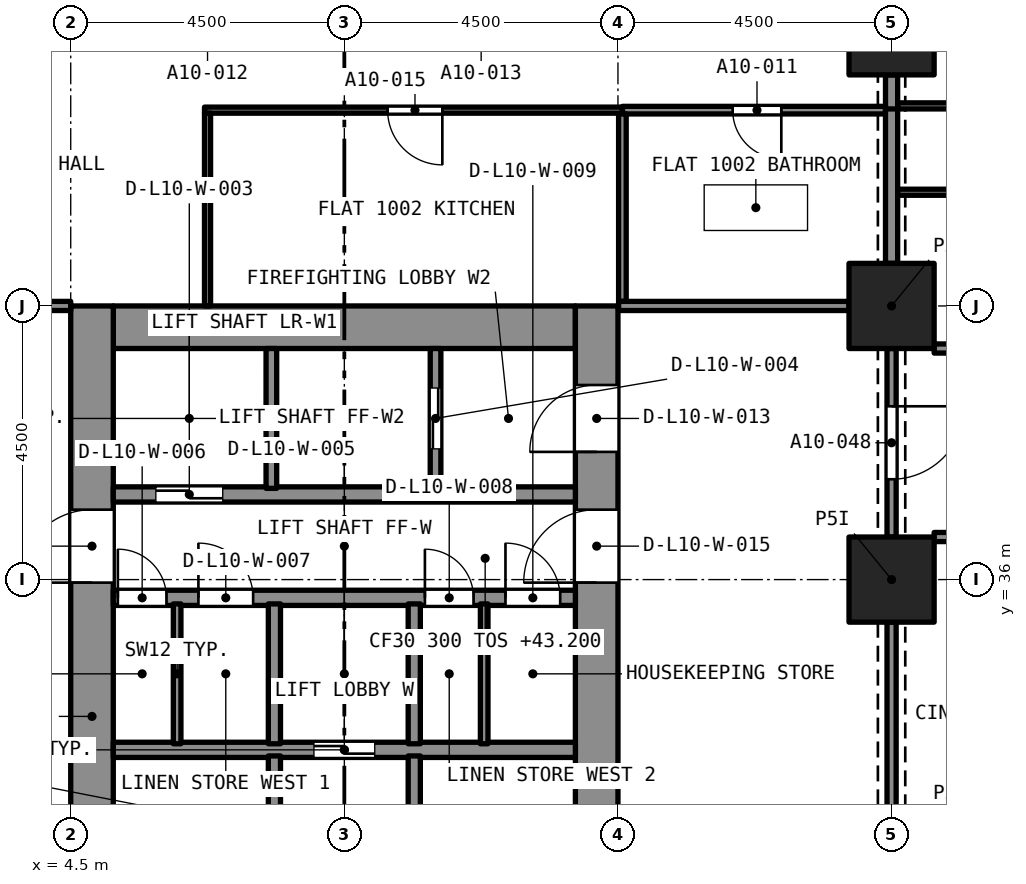
"""IFC4 building model, lengths in metres.
Left out: names, types, materials, properties, quantities, classifications, styles, units other than length and angle.
Written with IfcOpenShell. Run it as: python <this file> out.ifc"""

import sys

from ifc_helpers import new_model, si_unit, direction, frame, frame_2d, origin, origin_2d, place, context, subcontext, project, spatial, rectangle, extrude, element, fill, save


model = new_model("IFC4")
c1 = context("Model", 3, precision=1e-05, world=origin(), true_north=direction((0.0, 1.0)))
c2 = subcontext(c1, "Body", "Model", "MODEL_VIEW")
j1 = project(units=[si_unit("LENGTHUNIT", "METRE"), si_unit("PLANEANGLEUNIT", "RADIAN")], contexts=[c1])
p1 = place(None, origin())
s1 = spatial("IfcSite", under=j1, at=p1, CompositionType="ELEMENT")
p2 = place(p1, origin())
s2 = spatial("IfcBuilding", under=s1, at=p2, CompositionType="ELEMENT")
p3 = place(p2, frame((0.0, 0.0, 43.2)))
s3 = spatial("IfcBuildingStorey", under=s2, at=p3, CompositionType="ELEMENT", Elevation=43.2)
for number, where, z_axis, x_axis in (
    (1, (18.0, 36.0, 0.0), (0.0, 0.0, 1.0), (1.0, 0.0, 0.0)),
    (2, (18.0, 40.5, 0.0), (0.0, 0.0, 1.0), (1.0, 0.0, 0.0)),
    (3, (18.0, 45.0, 0.0), (0.0, 0.0, 1.0), (1.0, 0.0, 0.0)),
):
    element("IfcColumn", number, at=place(p3, frame(where, z_axis=z_axis, x_axis=x_axis)), inside=s3, PredefinedType="COLUMN", context=c2, shape_type="SweptSolid", body=[
        extrude(rectangle(XDim=1.4, YDim=1.4, at=origin_2d()), origin(), (0.0, 0.0, 1.0), 3.2),
    ])
p4 = place(p3, frame((5.2, 40.15, 0.0), z_axis=(0.0, 0.0, 1.0), x_axis=(1.0, 0.0, 0.0)))
e4 = element("IfcWall", 4, at=p4, inside=s3, PredefinedType="SOLIDWALL", context=c2, shape_type="SweptSolid", body=[
    extrude(rectangle(XDim=7.6, YDim=0.7, at=frame_2d((3.8, 0.0))), origin(), (0.0, 0.0, 1.0), 3.2),
])
p5 = place(p3, frame((4.85, 27.0, 0.0), z_axis=(0.0, 0.0, 1.0), x_axis=(0.0, 1.0, 0.0)))
e5 = element("IfcWall", 5, at=p5, inside=s3, PredefinedType="SOLIDWALL", context=c2, shape_type="SweptSolid", body=[
    extrude(rectangle(XDim=13.5, YDim=0.7, at=frame_2d((6.75, 0.0))), origin(), (0.0, 0.0, 1.0), 3.2),
])
p6 = place(p5, frame((8.95, 0.0, 0.0)))
e6 = element("IfcOpeningElement", 6, at=p6, cuts=e5, PredefinedType="OPENING", context=c2, shape_type="SweptSolid", body=[
    extrude(rectangle(XDim=1.2, YDim=2.1, at=frame_2d((0.6, 1.05))), frame((0.0, 0.36, 0.0), z_axis=(0.0, -1.0, 0.0), x_axis=(1.0, 0.0, 0.0)), (0.0, 0.0, 1.0), 0.72),
])
p7 = place(p3, frame((13.15, 27.0, 0.0), z_axis=(0.0, 0.0, 1.0), x_axis=(0.0, 1.0, 0.0)))
e7 = element("IfcWall", 7, at=p7, inside=s3, PredefinedType="SOLIDWALL", context=c2, shape_type="SweptSolid", body=[
    extrude(rectangle(XDim=13.5, YDim=0.7, at=frame_2d((6.75, 0.0))), origin(), (0.0, 0.0, 1.0), 3.2),
])
p8 = place(p7, frame((11.1, 0.0, 0.0)))
e8 = element("IfcOpeningElement", 8, at=p8, cuts=e7, PredefinedType="OPENING", context=c2, shape_type="SweptSolid", body=[
    extrude(rectangle(XDim=1.1, YDim=2.1, at=frame_2d((0.55, 1.05))), frame((0.0, 0.36, 0.0), z_axis=(0.0, -1.0, 0.0), x_axis=(1.0, 0.0, 0.0)), (0.0, 0.0, 1.0), 0.72),
])
p9 = place(p7, frame((8.95, 0.0, 0.0)))
e9 = element("IfcOpeningElement", 9, at=p9, cuts=e7, PredefinedType="OPENING", context=c2, shape_type="SweptSolid", body=[
    extrude(rectangle(XDim=1.2, YDim=2.1, at=frame_2d((0.6, 1.05))), frame((0.0, 0.36, 0.0), z_axis=(0.0, -1.0, 0.0), x_axis=(1.0, 0.0, 0.0)), (0.0, 0.0, 1.0), 0.72),
])
p10 = place(p3, frame((17.9, 43.72, 0.0), z_axis=(0.0, 0.0, 1.0), x_axis=(-1.0, 0.0, 0.0)))
e10 = element("IfcWall", 10, at=p10, inside=s3, PredefinedType="PARTITIONING", context=c2, shape_type="SweptSolid", body=[
    extrude(rectangle(XDim=4.327, YDim=0.125, at=frame_2d((2.163, 0.0))), origin(), (0.0, 0.0, 1.0), 2.9),
])
p11 = place(p10, frame((1.713, 0.0, 0.0)))
e11 = element("IfcOpeningElement", 11, at=p11, cuts=e10, PredefinedType="OPENING", context=c2, shape_type="SweptSolid", body=[
    extrude(rectangle(XDim=0.8, YDim=2.1, at=frame_2d((0.4, 1.05))), frame((0.0, 0.073, 0.0), z_axis=(0.0, -1.0, 0.0), x_axis=(1.0, 0.0, 0.0)), (0.0, 0.0, 1.0), 0.145),
])
p12 = place(p3, frame((13.573, 40.575, 0.0), z_axis=(0.0, 0.0, 1.0), x_axis=(0.0, 1.0, 0.0)))
e12 = element("IfcWall", 12, at=p12, inside=s3, PredefinedType="PARTITIONING", context=c2, shape_type="SweptSolid", body=[
    extrude(rectangle(XDim=3.083, YDim=0.125, at=frame_2d((1.541, 0.0))), origin(), (0.0, 0.0, 1.0), 2.9),
])
p13 = place(p3, frame((18.0, 41.2, 0.0), z_axis=(0.0, 0.0, 1.0), x_axis=(0.0, 1.0, 0.0)))
e13 = element("IfcWall", 13, at=p13, inside=s3, PredefinedType="PARTITIONING", context=c2, shape_type="SweptSolid", body=[
    extrude(rectangle(XDim=2.583, YDim=0.2, at=frame_2d((1.291, 0.0))), origin(), (0.0, 0.0, 1.0), 2.38),
])
p14 = place(p3, frame((13.511, 40.5, 0.0), z_axis=(0.0, 0.0, 1.0), x_axis=(1.0, 0.0, 0.0)))
e14 = element("IfcWall", 14, at=p14, inside=s3, PredefinedType="PARTITIONING", context=c2, shape_type="SweptSolid", body=[
    extrude(rectangle(XDim=3.789, YDim=0.15, at=frame_2d((1.895, 0.0))), origin(), (0.0, 0.0, 1.0), 2.9),
])
p15 = place(p3, frame((13.573, 43.72, 0.0), z_axis=(0.0, 0.0, 1.0), x_axis=(-1.0, 0.0, 0.0)))
e15 = element("IfcWall", 15, at=p15, inside=s3, PredefinedType="PARTITIONING", context=c2, shape_type="SweptSolid", body=[
    extrude(rectangle(XDim=6.873, YDim=0.1, at=frame_2d((3.437, 0.0))), origin(), (0.0, 0.0, 1.0), 2.9),
])
p16 = place(p15, frame((2.962, 0.0, 0.0)))
e16 = element("IfcOpeningElement", 16, at=p16, cuts=e15, PredefinedType="OPENING", context=c2, shape_type="SweptSolid", body=[
    extrude(rectangle(XDim=0.9, YDim=2.1, at=frame_2d((0.45, 1.05))), frame((0.0, 0.06, 0.0), z_axis=(0.0, -1.0, 0.0), x_axis=(1.0, 0.0, 0.0)), (0.0, 0.0, 1.0), 0.12),
])
p17 = place(p3, frame((6.75, 40.5, 0.0), z_axis=(0.0, 0.0, 1.0), x_axis=(0.0, 1.0, 0.0)))
e17 = element("IfcWall", 17, at=p17, inside=s3, PredefinedType="PARTITIONING", context=c2, shape_type="SweptSolid", body=[
    extrude(rectangle(XDim=3.17, YDim=0.1, at=frame_2d((1.585, 0.0))), origin(), (0.0, 0.0, 1.0), 2.9),
])
p18 = place(p3, frame((18.0, 43.74, 0.0), z_axis=(0.0, 0.0, 1.0), x_axis=(0.0, 1.0, 0.0)))
e18 = element("IfcWall", 18, at=p18, inside=s3, PredefinedType="PARTITIONING", context=c2, shape_type="SweptSolid", body=[
    extrude(rectangle(XDim=0.56, YDim=0.2, at=frame_2d((0.28, 0.0))), origin(), (0.0, 0.0, 1.0), 2.38),
])
p19 = place(p3, frame((0.7, 40.5, 0.0), z_axis=(0.0, 0.0, 1.0), x_axis=(1.0, 0.0, 0.0)))
e19 = element("IfcWall", 19, at=p19, inside=s3, PredefinedType="PARTITIONING", context=c2, shape_type="SweptSolid", body=[
    extrude(rectangle(XDim=3.8, YDim=0.15, at=frame_2d((1.9, 0.0))), origin(), (0.0, 0.0, 1.0), 2.9),
])
p20 = place(p19, frame((1.05, 0.0, 0.0)))
e20 = element("IfcOpeningElement", 20, at=p20, cuts=e19, PredefinedType="OPENING", context=c2, shape_type="SweptSolid", body=[
    extrude(rectangle(XDim=1.0, YDim=2.1, at=frame_2d((0.5, 1.05))), frame((0.0, 0.085, 0.0), z_axis=(0.0, -1.0, 0.0), x_axis=(1.0, 0.0, 0.0)), (0.0, 0.0, 1.0), 0.17),
])
p21 = place(p3, frame((27.425, 42.37, 0.0), z_axis=(0.0, 0.0, 1.0), x_axis=(-1.0, 0.0, 0.0)))
e21 = element("IfcWall", 21, at=p21, inside=s3, PredefinedType="PARTITIONING", context=c2, shape_type="SweptSolid", body=[
    extrude(rectangle(XDim=9.325, YDim=0.1, at=frame_2d((4.663, 0.0))), origin(), (0.0, 0.0, 1.0), 2.75),
])
p22 = place(p21, frame((4.288, 0.0, 0.0)))
e22 = element("IfcOpeningElement", 22, at=p22, cuts=e21, PredefinedType="OPENING", context=c2, shape_type="SweptSolid", body=[
    extrude(rectangle(XDim=0.9, YDim=2.1, at=frame_2d((0.45, 1.05))), frame((0.0, 0.06, 0.0), z_axis=(0.0, -1.0, 0.0), x_axis=(1.0, 0.0, 0.0)), (0.0, 0.0, 1.0), 0.12),
])
p23 = place(p3, frame((18.1, 43.79, 0.0), z_axis=(0.0, 0.0, 1.0), x_axis=(1.0, 0.0, 0.0)))
e23 = element("IfcWall", 23, at=p23, inside=s3, PredefinedType="PARTITIONING", context=c2, shape_type="SweptSolid", body=[
    extrude(rectangle(XDim=4.4, YDim=0.1, at=frame_2d((2.2, 0.0))), origin(), (0.0, 0.0, 1.0), 2.75),
])
p24 = place(p23, frame((1.65, 0.0, 0.0)))
e24 = element("IfcOpeningElement", 24, at=p24, cuts=e23, PredefinedType="OPENING", context=c2, shape_type="SweptSolid", body=[
    extrude(rectangle(XDim=1.0, YDim=2.1, at=frame_2d((0.5, 1.05))), frame((0.0, 0.06, 0.0), z_axis=(0.0, -1.0, 0.0), x_axis=(1.0, 0.0, 0.0)), (0.0, 0.0, 1.0), 0.12),
])
p25 = place(p3, frame((18.7, 39.8, 0.0), z_axis=(0.0, 0.0, 1.0), x_axis=(1.0, 0.0, 0.0)))
e25 = element("IfcWall", 25, at=p25, inside=s3, PredefinedType="PARTITIONING", context=c2, shape_type="SweptSolid", body=[
    extrude(rectangle(XDim=8.675, YDim=0.15, at=frame_2d((4.337, 0.0))), origin(), (0.0, 0.0, 1.0), 2.75),
])
p26 = place(p3, frame((22.5, 36.7, 0.0), z_axis=(0.0, 0.0, 1.0), x_axis=(-1.0, 0.0, 0.0)))
e26 = element("IfcWall", 26, at=p26, inside=s3, PredefinedType="PARTITIONING", context=c2, shape_type="SweptSolid", body=[
    extrude(rectangle(XDim=3.8, YDim=0.15, at=frame_2d((1.9, 0.0))), origin(), (0.0, 0.0, 1.0), 2.75),
])
p27 = place(p26, frame((1.75, 0.0, 0.0)))
e27 = element("IfcOpeningElement", 27, at=p27, cuts=e26, PredefinedType="OPENING", context=c2, shape_type="SweptSolid", body=[
    extrude(rectangle(XDim=1.0, YDim=2.1, at=frame_2d((0.5, 1.05))), frame((0.0, 0.085, 0.0), z_axis=(0.0, -1.0, 0.0), x_axis=(1.0, 0.0, 0.0)), (0.0, 0.0, 1.0), 0.17),
])
p28 = place(p3, frame((18.0, 39.8, 0.0), z_axis=(0.0, 0.0, 1.0), x_axis=(0.0, -1.0, 0.0)))
e28 = element("IfcWall", 28, at=p28, inside=s3, PredefinedType="PARTITIONING", context=c2, shape_type="SweptSolid", body=[
    extrude(rectangle(XDim=3.1, YDim=0.15, at=frame_2d((1.55, 0.0))), origin(), (0.0, 0.0, 1.0), 2.38),
])
p29 = place(p28, frame((0.95, 0.0, 0.0)))
e29 = element("IfcOpeningElement", 29, at=p29, cuts=e28, PredefinedType="OPENING", context=c2, shape_type="SweptSolid", body=[
    extrude(rectangle(XDim=1.2, YDim=2.1, at=frame_2d((0.6, 1.05))), frame((0.0, 0.085, 0.0), z_axis=(0.0, -1.0, 0.0), x_axis=(1.0, 0.0, 0.0)), (0.0, 0.0, 1.0), 0.17),
])
p30 = place(p3, frame((18.0, 32.2, 0.0), z_axis=(0.0, 0.0, 1.0), x_axis=(0.0, 1.0, 0.0)))
e30 = element("IfcWall", 30, at=p30, inside=s3, PredefinedType="PARTITIONING", context=c2, shape_type="SweptSolid", body=[
    extrude(rectangle(XDim=3.1, YDim=0.15, at=frame_2d((1.55, 0.0))), origin(), (0.0, 0.0, 1.0), 2.38),
])
p31 = place(p3, frame((5.2, 33.2, 0.0), z_axis=(0.0, 0.0, 1.0), x_axis=(1.0, 0.0, 0.0)))
e31 = element("IfcWall", 31, at=p31, inside=s3, PredefinedType="SOLIDWALL", context=c2, shape_type="SweptSolid", body=[
    extrude(rectangle(XDim=7.6, YDim=0.25, at=frame_2d((3.8, 0.0))), origin(), (0.0, 0.0, 1.0), 2.9),
])
p32 = place(p31, frame((3.3, 0.0, 0.0)))
e32 = element("IfcOpeningElement", 32, at=p32, cuts=e31, PredefinedType="OPENING", context=c2, shape_type="SweptSolid", body=[
    extrude(rectangle(XDim=1.0, YDim=2.1, at=frame_2d((0.5, 1.05))), frame((0.0, 0.135, 0.0), z_axis=(0.0, -1.0, 0.0), x_axis=(1.0, 0.0, 0.0)), (0.0, 0.0, 1.0), 0.27),
])
p33 = place(p3, frame((5.2, 35.7, 0.0), z_axis=(0.0, 0.0, 1.0), x_axis=(1.0, 0.0, 0.0)))
e33 = element("IfcWall", 33, at=p33, inside=s3, PredefinedType="SOLIDWALL", context=c2, shape_type="SweptSolid", body=[
    extrude(rectangle(XDim=7.6, YDim=0.25, at=frame_2d((3.8, 0.0))), origin(), (0.0, 0.0, 1.0), 2.9),
])
p34 = place(p33, frame((0.075, 0.0, 0.0)))
e34 = element("IfcOpeningElement", 34, at=p34, cuts=e33, PredefinedType="OPENING", context=c2, shape_type="SweptSolid", body=[
    extrude(rectangle(XDim=0.8, YDim=2.1, at=frame_2d((0.4, 1.05))), frame((0.0, 0.135, 0.0), z_axis=(0.0, -1.0, 0.0), x_axis=(1.0, 0.0, 0.0)), (0.0, 0.0, 1.0), 0.27),
])
p35 = place(p33, frame((1.4, 0.0, 0.0)))
e35 = element("IfcOpeningElement", 35, at=p35, cuts=e33, PredefinedType="OPENING", context=c2, shape_type="SweptSolid", body=[
    extrude(rectangle(XDim=0.9, YDim=2.1, at=frame_2d((0.45, 1.05))), frame((0.0, 0.135, 0.0), z_axis=(0.0, -1.0, 0.0), x_axis=(1.0, 0.0, 0.0)), (0.0, 0.0, 1.0), 0.27),
])
p36 = place(p33, frame((5.125, 0.0, 0.0)))
e36 = element("IfcOpeningElement", 36, at=p36, cuts=e33, PredefinedType="OPENING", context=c2, shape_type="SweptSolid", body=[
    extrude(rectangle(XDim=0.8, YDim=2.1, at=frame_2d((0.4, 1.05))), frame((0.0, 0.135, 0.0), z_axis=(0.0, -1.0, 0.0), x_axis=(1.0, 0.0, 0.0)), (0.0, 0.0, 1.0), 0.27),
])
p37 = place(p33, frame((6.45, 0.0, 0.0)))
e37 = element("IfcOpeningElement", 37, at=p37, cuts=e33, PredefinedType="OPENING", context=c2, shape_type="SweptSolid", body=[
    extrude(rectangle(XDim=0.9, YDim=2.1, at=frame_2d((0.45, 1.05))), frame((0.0, 0.135, 0.0), z_axis=(0.0, -1.0, 0.0), x_axis=(1.0, 0.0, 0.0)), (0.0, 0.0, 1.0), 0.27),
])
p38 = place(p3, frame((5.2, 37.4, 0.0), z_axis=(0.0, 0.0, 1.0), x_axis=(1.0, 0.0, 0.0)))
e38 = element("IfcWall", 38, at=p38, inside=s3, PredefinedType="SOLIDWALL", context=c2, shape_type="SweptSolid", body=[
    extrude(rectangle(XDim=7.6, YDim=0.25, at=frame_2d((3.8, 0.0))), origin(), (0.0, 0.0, 1.0), 2.9),
])
p39 = place(p38, frame((0.7, 0.0, 0.0)))
e39 = element("IfcOpeningElement", 39, at=p39, cuts=e38, PredefinedType="OPENING", context=c2, shape_type="SweptSolid", body=[
    extrude(rectangle(XDim=1.1, YDim=2.4, at=frame_2d((0.55, 1.2))), frame((0.0, 0.135, 0.0), z_axis=(0.0, -1.0, 0.0), x_axis=(1.0, 0.0, 0.0)), (0.0, 0.0, 1.0), 0.27),
])
p40 = place(p3, frame((7.85, 27.7, 0.0), z_axis=(0.0, 0.0, 1.0), x_axis=(0.0, 1.0, 0.0)))
e40 = element("IfcWall", 40, at=p40, inside=s3, PredefinedType="SOLIDWALL", context=c2, shape_type="SweptSolid", body=[
    extrude(rectangle(XDim=5.4, YDim=0.2, at=frame_2d((2.7, 0.0))), origin(), (0.0, 0.0, 1.0), 2.9),
])
p41 = place(p40, frame((0.2, 0.0, 0.0)))
e41 = element("IfcOpeningElement", 41, at=p41, cuts=e40, PredefinedType="OPENING", context=c2, shape_type="SweptSolid", body=[
    extrude(rectangle(XDim=0.9, YDim=2.1, at=frame_2d((0.45, 1.05))), frame((0.0, 0.11, 0.0), z_axis=(0.0, -1.0, 0.0), x_axis=(1.0, 0.0, 0.0)), (0.0, 0.0, 1.0), 0.22),
])
p42 = place(p3, frame((10.15, 27.7, 0.0), z_axis=(0.0, 0.0, 1.0), x_axis=(0.0, 1.0, 0.0)))
e42 = element("IfcWall", 42, at=p42, inside=s3, PredefinedType="SOLIDWALL", context=c2, shape_type="SweptSolid", body=[
    extrude(rectangle(XDim=5.4, YDim=0.2, at=frame_2d((2.7, 0.0))), origin(), (0.0, 0.0, 1.0), 2.9),
])
p43 = place(p42, frame((0.2, 0.0, 0.0)))
e43 = element("IfcOpeningElement", 43, at=p43, cuts=e42, PredefinedType="OPENING", context=c2, shape_type="SweptSolid", body=[
    extrude(rectangle(XDim=0.9, YDim=2.1, at=frame_2d((0.45, 1.05))), frame((0.0, 0.11, 0.0), z_axis=(0.0, -1.0, 0.0), x_axis=(1.0, 0.0, 0.0)), (0.0, 0.0, 1.0), 0.22),
])
for number, where, z_axis, x_axis in (
    (44, (7.85, 33.3, 0.0), (0.0, 0.0, 1.0), (0.0, 1.0, 0.0)),
    (45, (10.15, 33.3, 0.0), (0.0, 0.0, 1.0), (0.0, 1.0, 0.0)),
):
    element("IfcWall", number, at=place(p3, frame(where, z_axis=z_axis, x_axis=x_axis)), inside=s3, PredefinedType="SOLIDWALL", context=c2, shape_type="SweptSolid", body=[
        extrude(rectangle(XDim=2.3, YDim=0.2, at=frame_2d((1.15, 0.0))), origin(), (0.0, 0.0, 1.0), 2.9),
    ])
p44 = place(p3, frame((7.8, 37.5, 0.0), z_axis=(0.0, 0.0, 1.0), x_axis=(0.0, 1.0, 0.0)))
e46 = element("IfcWall", 46, at=p44, inside=s3, PredefinedType="SOLIDWALL", context=c2, shape_type="SweptSolid", body=[
    extrude(rectangle(XDim=2.3, YDim=0.175, at=frame_2d((1.15, 0.0))), origin(), (0.0, 0.0, 1.0), 2.9),
])
p45 = place(p3, frame((10.5, 37.5, 0.0), z_axis=(0.0, 0.0, 1.0), x_axis=(0.0, 1.0, 0.0)))
e47 = element("IfcWall", 47, at=p45, inside=s3, PredefinedType="SOLIDWALL", context=c2, shape_type="SweptSolid", body=[
    extrude(rectangle(XDim=2.3, YDim=0.175, at=frame_2d((1.15, 0.0))), origin(), (0.0, 0.0, 1.0), 2.9),
])
p46 = place(p45, frame((0.65, 0.0, 0.0)))
e48 = element("IfcOpeningElement", 48, at=p46, cuts=e47, PredefinedType="OPENING", context=c2, shape_type="SweptSolid", body=[
    extrude(rectangle(XDim=1.0, YDim=2.1, at=frame_2d((0.5, 1.05))), frame((0.0, 0.097, 0.0), z_axis=(0.0, -1.0, 0.0), x_axis=(1.0, 0.0, 0.0)), (0.0, 0.0, 1.0), 0.195),
])
for number, where, z_axis, x_axis in (
    (49, (6.25, 33.3, 0.0), (0.0, 0.0, 1.0), (0.0, 1.0, 0.0)),
    (50, (11.3, 33.3, 0.0), (0.0, 0.0, 1.0), (0.0, 1.0, 0.0)),
):
    element("IfcWall", number, at=place(p3, frame(where, z_axis=z_axis, x_axis=x_axis)), inside=s3, PredefinedType="PARTITIONING", context=c2, shape_type="SweptSolid", body=[
        extrude(rectangle(XDim=2.3, YDim=0.125, at=frame_2d((1.15, 0.0))), origin(), (0.0, 0.0, 1.0), 2.9),
    ])
p47 = place(p11, origin())
e51 = element("IfcDoor", 51, at=p47, inside=s3, OperationType="SINGLE_SWING_LEFT", PredefinedType="DOOR", context=c2, shape_type="SweptSolid", body=[
    extrude(rectangle(XDim=0.8, YDim=2.1, at=frame_2d((0.4, 1.05))), frame((0.0, 0.025, 0.0), z_axis=(0.0, -1.0, 0.0), x_axis=(1.0, 0.0, 0.0)), (0.0, 0.0, 1.0), 0.05),
])
fill(e11, e51)
p48 = place(p16, origin())
e52 = element("IfcDoor", 52, at=p48, inside=s3, OperationType="SINGLE_SWING_LEFT", PredefinedType="DOOR", context=c2, shape_type="SweptSolid", body=[
    extrude(rectangle(XDim=0.9, YDim=2.1, at=frame_2d((0.45, 1.05))), frame((0.0, 0.025, 0.0), z_axis=(0.0, -1.0, 0.0), x_axis=(1.0, 0.0, 0.0)), (0.0, 0.0, 1.0), 0.05),
])
fill(e16, e52)
p49 = place(p29, origin())
e53 = element("IfcDoor", 53, at=p49, inside=s3, OperationType="SINGLE_SWING_LEFT", PredefinedType="DOOR", context=c2, shape_type="SweptSolid", body=[
    extrude(rectangle(XDim=1.2, YDim=2.1, at=frame_2d((0.6, 1.05))), frame((0.0, 0.025, 0.0), z_axis=(0.0, -1.0, 0.0), x_axis=(1.0, 0.0, 0.0)), (0.0, 0.0, 1.0), 0.05),
])
fill(e29, e53)
p50 = place(p39, origin())
e54 = element("IfcDoor", 54, at=p50, inside=s3, OperationType="SLIDING_TO_LEFT", PredefinedType="DOOR", context=c2, shape_type="SweptSolid", body=[
    extrude(rectangle(XDim=1.1, YDim=2.4, at=frame_2d((0.55, 1.2))), frame((0.0, 0.025, 0.0), z_axis=(0.0, -1.0, 0.0), x_axis=(1.0, 0.0, 0.0)), (0.0, 0.0, 1.0), 0.05),
])
fill(e39, e54)
p51 = place(p46, origin())
e55 = element("IfcDoor", 55, at=p51, inside=s3, OperationType="SLIDING_TO_LEFT", PredefinedType="DOOR", context=c2, shape_type="SweptSolid", body=[
    extrude(rectangle(XDim=1.0, YDim=2.1, at=frame_2d((0.5, 1.05))), frame((0.0, 0.025, 0.0), z_axis=(0.0, -1.0, 0.0), x_axis=(1.0, 0.0, 0.0)), (0.0, 0.0, 1.0), 0.05),
])
fill(e48, e55)
p52 = place(p32, origin())
e56 = element("IfcDoor", 56, at=p52, inside=s3, OperationType="SLIDING_TO_LEFT", PredefinedType="DOOR", context=c2, shape_type="SweptSolid", body=[
    extrude(rectangle(XDim=1.0, YDim=2.1, at=frame_2d((0.5, 1.05))), frame((0.0, 0.025, 0.0), z_axis=(0.0, -1.0, 0.0), x_axis=(1.0, 0.0, 0.0)), (0.0, 0.0, 1.0), 0.05),
])
fill(e32, e56)
p53 = place(p34, origin())
e57 = element("IfcDoor", 57, at=p53, inside=s3, OperationType="SINGLE_SWING_LEFT", PredefinedType="DOOR", context=c2, shape_type="SweptSolid", body=[
    extrude(rectangle(XDim=0.8, YDim=2.1, at=frame_2d((0.4, 1.05))), frame((0.0, 0.025, 0.0), z_axis=(0.0, -1.0, 0.0), x_axis=(1.0, 0.0, 0.0)), (0.0, 0.0, 1.0), 0.05),
])
fill(e34, e57)
p54 = place(p35, origin())
e58 = element("IfcDoor", 58, at=p54, inside=s3, OperationType="SINGLE_SWING_LEFT", PredefinedType="DOOR", context=c2, shape_type="SweptSolid", body=[
    extrude(rectangle(XDim=0.9, YDim=2.1, at=frame_2d((0.45, 1.05))), frame((0.0, 0.025, 0.0), z_axis=(0.0, -1.0, 0.0), x_axis=(1.0, 0.0, 0.0)), (0.0, 0.0, 1.0), 0.05),
])
fill(e35, e58)
p55 = place(p36, origin())
e59 = element("IfcDoor", 59, at=p55, inside=s3, OperationType="SINGLE_SWING_LEFT", PredefinedType="DOOR", context=c2, shape_type="SweptSolid", body=[
    extrude(rectangle(XDim=0.8, YDim=2.1, at=frame_2d((0.4, 1.05))), frame((0.0, 0.025, 0.0), z_axis=(0.0, -1.0, 0.0), x_axis=(1.0, 0.0, 0.0)), (0.0, 0.0, 1.0), 0.05),
])
fill(e36, e59)
p56 = place(p37, origin())
e60 = element("IfcDoor", 60, at=p56, inside=s3, OperationType="SINGLE_SWING_LEFT", PredefinedType="DOOR", context=c2, shape_type="SweptSolid", body=[
    extrude(rectangle(XDim=0.9, YDim=2.1, at=frame_2d((0.45, 1.05))), frame((0.0, 0.025, 0.0), z_axis=(0.0, -1.0, 0.0), x_axis=(1.0, 0.0, 0.0)), (0.0, 0.0, 1.0), 0.05),
])
fill(e37, e60)
p57 = place(p8, origin())
e61 = element("IfcDoor", 61, at=p57, inside=s3, OperationType="SINGLE_SWING_LEFT", PredefinedType="DOOR", context=c2, shape_type="SweptSolid", body=[
    extrude(rectangle(XDim=1.1, YDim=2.1, at=frame_2d((0.55, 1.05))), frame((0.0, 0.025, 0.0), z_axis=(0.0, -1.0, 0.0), x_axis=(1.0, 0.0, 0.0)), (0.0, 0.0, 1.0), 0.05),
])
fill(e8, e61)
p58 = place(p6, origin())
e62 = element("IfcDoor", 62, at=p58, inside=s3, OperationType="SINGLE_SWING_LEFT", PredefinedType="DOOR", context=c2, shape_type="SweptSolid", body=[
    extrude(rectangle(XDim=1.2, YDim=2.1, at=frame_2d((0.6, 1.05))), frame((0.0, 0.025, 0.0), z_axis=(0.0, -1.0, 0.0), x_axis=(1.0, 0.0, 0.0)), (0.0, 0.0, 1.0), 0.05),
])
fill(e6, e62)
p59 = place(p9, origin())
e63 = element("IfcDoor", 63, at=p59, inside=s3, OperationType="SINGLE_SWING_LEFT", PredefinedType="DOOR", context=c2, shape_type="SweptSolid", body=[
    extrude(rectangle(XDim=1.2, YDim=2.1, at=frame_2d((0.6, 1.05))), frame((0.0, 0.025, 0.0), z_axis=(0.0, -1.0, 0.0), x_axis=(1.0, 0.0, 0.0)), (0.0, 0.0, 1.0), 0.05),
])
fill(e9, e63)
save(model, sys.argv[1])
